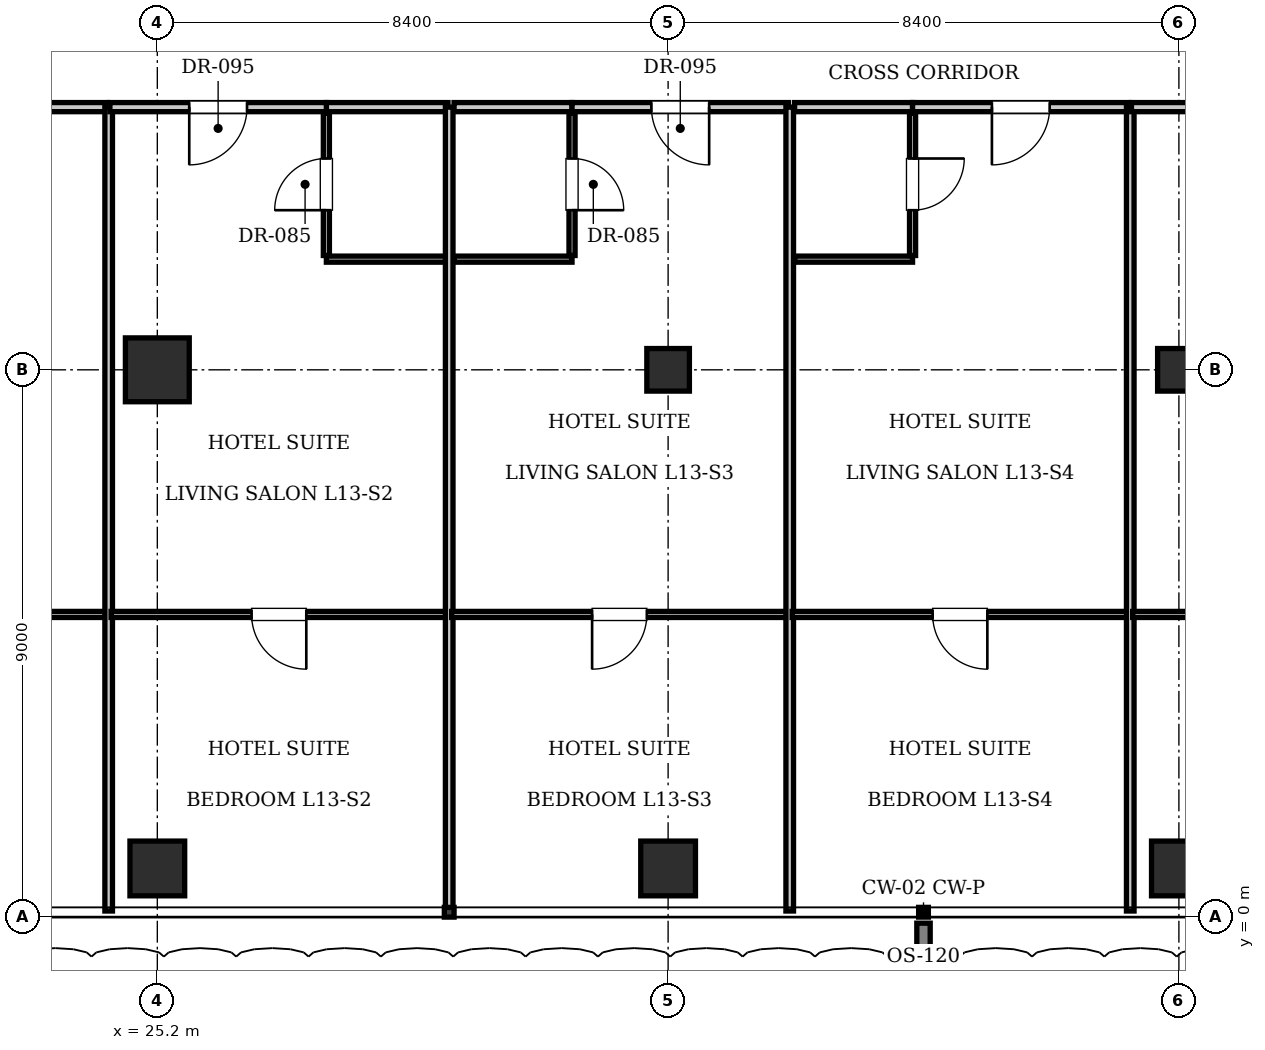
"""IFC4 building model, lengths in metres.
Left out: names, types, materials, properties, quantities, classifications, styles, units other than length and angle.
Written with IfcOpenShell. Run it as: python <this file> out.ifc"""

import sys

from ifc_helpers import new_model, si_unit, direction, frame, frame_2d, origin, origin_2d, place, context, subcontext, project, spatial, rectangle, i_section, extrude, element, fill, save


model = new_model("IFC4")
c1 = context("Model", 3, precision=1e-05, world=origin(), true_north=direction((0.0, 1.0)))
c2 = subcontext(c1, "Body", "Model", "MODEL_VIEW")
j1 = project(units=[si_unit("LENGTHUNIT", "METRE"), si_unit("PLANEANGLEUNIT", "RADIAN")], contexts=[c1])
p1 = place(None, origin())
s1 = spatial("IfcSite", under=j1, at=p1, CompositionType="ELEMENT")
p2 = place(p1, origin())
s2 = spatial("IfcBuilding", under=s1, at=p2, CompositionType="ELEMENT")
p3 = place(p2, frame((0.0, 0.0, 57.75)))
s3 = spatial("IfcBuildingStorey", under=s2, at=p3, CompositionType="ELEMENT", Elevation=57.75)
p4 = place(p3, frame((25.2, 9.0, 0.0), z_axis=(0.0, 0.0, 1.0), x_axis=(1.0, 0.0, 0.0)))
e1 = element("IfcColumn", 1, at=p4, inside=s3, PredefinedType="COLUMN", context=c2, shape_type="SweptSolid", body=[
    extrude(rectangle(XDim=1.05, YDim=1.05, at=origin_2d()), origin(), (0.0, 0.0, 1.0), 3.85),
])
for number, where, z_axis, x_axis in (
    (2, (33.6, 9.0, 0.0), (0.0, 0.0, 1.0), (1.0, 0.0, 0.0)),
    (3, (42.0, 9.0, 0.0), (0.0, 0.0, 1.0), (1.0, 0.0, 0.0)),
):
    element("IfcColumn", number, at=place(p3, frame(where, z_axis=z_axis, x_axis=x_axis)), inside=s3, PredefinedType="COLUMN", context=c2, shape_type="SweptSolid", body=[
        extrude(i_section(OverallWidth=0.7, OverallDepth=0.7, WebThickness=0.028, FlangeThickness=0.044, at=origin_2d()), origin(), (0.0, 0.0, 1.0), 3.85),
    ])
for number, where, z_axis, x_axis in (
    (4, (25.2, 0.8, 0.0), (0.0, 0.0, 1.0), (1.0, 0.0, 0.0)),
    (5, (33.6, 0.8, 0.0), (0.0, 0.0, 1.0), (1.0, 0.0, 0.0)),
    (6, (42.0, 0.8, 0.0), (0.0, 0.0, 1.0), (1.0, 0.0, 0.0)),
):
    element("IfcColumn", number, at=place(p3, frame(where, z_axis=z_axis, x_axis=x_axis)), inside=s3, PredefinedType="COLUMN", context=c2, shape_type="SweptSolid", body=[
        extrude(rectangle(XDim=0.9, YDim=0.9, at=origin_2d()), origin(), (0.0, 0.0, 1.0), 3.85),
    ])
p5 = place(p3, frame((20.82, 13.32, 0.0), z_axis=(0.0, 0.0, 1.0), x_axis=(1.0, 0.0, 0.0)))
e7 = element("IfcWall", 7, at=p5, inside=s3, PredefinedType="PARTITIONING", context=c2, shape_type="SweptSolid", body=[
    extrude(rectangle(XDim=3.56, YDim=0.15, at=frame_2d((1.78, 0.0))), origin(), (0.0, 0.0, 1.0), 3.61),
])
p6 = place(p5, frame((1.305, 0.0, 0.0)))
e8 = element("IfcOpeningElement", 8, at=p6, cuts=e7, PredefinedType="OPENING", context=c2, shape_type="SweptSolid", body=[
    extrude(rectangle(XDim=0.95, YDim=2.15, at=frame_2d((0.475, 1.075))), frame((0.0, 0.085, 0.0), z_axis=(0.0, -1.0, 0.0), x_axis=(1.0, 0.0, 0.0)), (0.0, 0.0, 1.0), 0.17),
])
p7 = place(p3, frame((18.84, 4.977, 0.0), z_axis=(0.0, 0.0, 1.0), x_axis=(1.0, 0.0, 0.0)))
e9 = element("IfcWall", 9, at=p7, inside=s3, PredefinedType="PARTITIONING", context=c2, shape_type="SweptSolid", body=[
    extrude(rectangle(XDim=5.52, YDim=0.1, at=frame_2d((2.76, 0.0))), origin(), (0.0, 0.0, 1.0), 3.61),
])
p8 = place(p7, frame((2.31, 0.0, 0.0)))
e10 = element("IfcOpeningElement", 10, at=p8, cuts=e9, PredefinedType="OPENING", context=c2, shape_type="SweptSolid", body=[
    extrude(rectangle(XDim=0.9, YDim=2.1, at=frame_2d((0.45, 1.05))), frame((0.0, 0.06, 0.0), z_axis=(0.0, -1.0, 0.0), x_axis=(1.0, 0.0, 0.0)), (0.0, 0.0, 1.0), 0.12),
])
p9 = place(p3, frame((24.4, 0.1, 0.0), z_axis=(0.0, 0.0, 1.0), x_axis=(0.0, 1.0, 0.0)))
e11 = element("IfcWall", 11, at=p9, inside=s3, PredefinedType="PARTITIONING", context=c2, shape_type="SweptSolid", body=[
    extrude(rectangle(XDim=13.22, YDim=0.125, at=frame_2d((6.61, 0.0))), origin(), (0.0, 0.0, 1.0), 3.61),
])
p10 = place(p3, frame((27.98, 13.32, 0.0), z_axis=(0.0, 0.0, 1.0), x_axis=(1.0, 0.0, 0.0)))
e12 = element("IfcWall", 12, at=p10, inside=s3, PredefinedType="PARTITIONING", context=c2, shape_type="SweptSolid", body=[
    extrude(rectangle(XDim=2.0, YDim=0.15, at=frame_2d((1.0, 0.0))), origin(), (0.0, 0.0, 1.0), 3.61),
])
p11 = place(p3, frame((27.98, 10.82, 0.0), z_axis=(0.0, 0.0, 1.0), x_axis=(1.0, 0.0, 0.0)))
e13 = element("IfcWall", 13, at=p11, inside=s3, PredefinedType="PARTITIONING", context=c2, shape_type="SweptSolid", body=[
    extrude(rectangle(XDim=1.98, YDim=0.1, at=frame_2d((0.99, 0.0))), origin(), (0.0, 0.0, 1.0), 3.61),
])
p12 = place(p3, frame((27.98, 10.88, 0.0), z_axis=(0.0, 0.0, 1.0), x_axis=(0.0, 1.0, 0.0)))
e14 = element("IfcWall", 14, at=p12, inside=s3, PredefinedType="PARTITIONING", context=c2, shape_type="SweptSolid", body=[
    extrude(rectangle(XDim=2.34, YDim=0.1, at=frame_2d((1.17, 0.0))), origin(), (0.0, 0.0, 1.0), 3.61),
])
p13 = place(p12, frame((0.745, 0.0, 0.0)))
e15 = element("IfcOpeningElement", 15, at=p13, cuts=e14, PredefinedType="OPENING", context=c2, shape_type="SweptSolid", body=[
    extrude(rectangle(XDim=0.85, YDim=2.1, at=frame_2d((0.425, 1.05))), frame((0.0, 0.06, 0.0), z_axis=(0.0, -1.0, 0.0), x_axis=(1.0, 0.0, 0.0)), (0.0, 0.0, 1.0), 0.12),
])
p14 = place(p3, frame((24.42, 13.32, 0.0), z_axis=(0.0, 0.0, 1.0), x_axis=(1.0, 0.0, 0.0)))
e16 = element("IfcWall", 16, at=p14, inside=s3, PredefinedType="PARTITIONING", context=c2, shape_type="SweptSolid", body=[
    extrude(rectangle(XDim=3.56, YDim=0.15, at=frame_2d((1.78, 0.0))), origin(), (0.0, 0.0, 1.0), 3.61),
])
p15 = place(p14, frame((1.305, 0.0, 0.0)))
e17 = element("IfcOpeningElement", 17, at=p15, cuts=e16, PredefinedType="OPENING", context=c2, shape_type="SweptSolid", body=[
    extrude(rectangle(XDim=0.95, YDim=2.15, at=frame_2d((0.475, 1.075))), frame((0.0, 0.085, 0.0), z_axis=(0.0, -1.0, 0.0), x_axis=(1.0, 0.0, 0.0)), (0.0, 0.0, 1.0), 0.17),
])
p16 = place(p3, frame((24.44, 4.977, 0.0), z_axis=(0.0, 0.0, 1.0), x_axis=(1.0, 0.0, 0.0)))
e18 = element("IfcWall", 18, at=p16, inside=s3, PredefinedType="PARTITIONING", context=c2, shape_type="SweptSolid", body=[
    extrude(rectangle(XDim=5.52, YDim=0.1, at=frame_2d((2.76, 0.0))), origin(), (0.0, 0.0, 1.0), 3.61),
])
p17 = place(p16, frame((2.31, 0.0, 0.0)))
e19 = element("IfcOpeningElement", 19, at=p17, cuts=e18, PredefinedType="OPENING", context=c2, shape_type="SweptSolid", body=[
    extrude(rectangle(XDim=0.9, YDim=2.1, at=frame_2d((0.45, 1.05))), frame((0.0, 0.06, 0.0), z_axis=(0.0, -1.0, 0.0), x_axis=(1.0, 0.0, 0.0)), (0.0, 0.0, 1.0), 0.12),
])
p18 = place(p3, frame((30.0, 0.1, 0.0), z_axis=(0.0, 0.0, 1.0), x_axis=(0.0, 1.0, 0.0)))
e20 = element("IfcWall", 20, at=p18, inside=s3, PredefinedType="PARTITIONING", context=c2, shape_type="SweptSolid", body=[
    extrude(rectangle(XDim=13.22, YDim=0.125, at=frame_2d((6.61, 0.0))), origin(), (0.0, 0.0, 1.0), 3.61),
])
p19 = place(p3, frame((30.08, 13.32, 0.0), z_axis=(0.0, 0.0, 1.0), x_axis=(1.0, 0.0, 0.0)))
e21 = element("IfcWall", 21, at=p19, inside=s3, PredefinedType="PARTITIONING", context=c2, shape_type="SweptSolid", body=[
    extrude(rectangle(XDim=1.94, YDim=0.15, at=frame_2d((0.97, 0.0))), origin(), (0.0, 0.0, 1.0), 3.61),
])
p20 = place(p3, frame((30.08, 10.82, 0.0), z_axis=(0.0, 0.0, 1.0), x_axis=(1.0, 0.0, 0.0)))
e22 = element("IfcWall", 22, at=p20, inside=s3, PredefinedType="PARTITIONING", context=c2, shape_type="SweptSolid", body=[
    extrude(rectangle(XDim=1.94, YDim=0.1, at=frame_2d((0.97, 0.0))), origin(), (0.0, 0.0, 1.0), 3.61),
])
p21 = place(p3, frame((32.02, 10.88, 0.0), z_axis=(0.0, 0.0, 1.0), x_axis=(0.0, 1.0, 0.0)))
e23 = element("IfcWall", 23, at=p21, inside=s3, PredefinedType="PARTITIONING", context=c2, shape_type="SweptSolid", body=[
    extrude(rectangle(XDim=2.34, YDim=0.1, at=frame_2d((1.17, 0.0))), origin(), (0.0, 0.0, 1.0), 3.61),
])
p22 = place(p21, frame((0.745, 0.0, 0.0)))
e24 = element("IfcOpeningElement", 24, at=p22, cuts=e23, PredefinedType="OPENING", context=c2, shape_type="SweptSolid", body=[
    extrude(rectangle(XDim=0.85, YDim=2.1, at=frame_2d((0.425, 1.05))), frame((0.0, 0.06, 0.0), z_axis=(0.0, -1.0, 0.0), x_axis=(1.0, 0.0, 0.0)), (0.0, 0.0, 1.0), 0.12),
])
p23 = place(p3, frame((32.02, 13.32, 0.0), z_axis=(0.0, 0.0, 1.0), x_axis=(1.0, 0.0, 0.0)))
e25 = element("IfcWall", 25, at=p23, inside=s3, PredefinedType="PARTITIONING", context=c2, shape_type="SweptSolid", body=[
    extrude(rectangle(XDim=3.56, YDim=0.15, at=frame_2d((1.78, 0.0))), origin(), (0.0, 0.0, 1.0), 3.61),
])
p24 = place(p23, frame((1.305, 0.0, 0.0)))
e26 = element("IfcOpeningElement", 26, at=p24, cuts=e25, PredefinedType="OPENING", context=c2, shape_type="SweptSolid", body=[
    extrude(rectangle(XDim=0.95, YDim=2.15, at=frame_2d((0.475, 1.075))), frame((0.0, 0.085, 0.0), z_axis=(0.0, -1.0, 0.0), x_axis=(1.0, 0.0, 0.0)), (0.0, 0.0, 1.0), 0.17),
])
p25 = place(p3, frame((30.04, 4.977, 0.0), z_axis=(0.0, 0.0, 1.0), x_axis=(1.0, 0.0, 0.0)))
e27 = element("IfcWall", 27, at=p25, inside=s3, PredefinedType="PARTITIONING", context=c2, shape_type="SweptSolid", body=[
    extrude(rectangle(XDim=5.52, YDim=0.1, at=frame_2d((2.76, 0.0))), origin(), (0.0, 0.0, 1.0), 3.61),
])
p26 = place(p25, frame((2.31, 0.0, 0.0)))
e28 = element("IfcOpeningElement", 28, at=p26, cuts=e27, PredefinedType="OPENING", context=c2, shape_type="SweptSolid", body=[
    extrude(rectangle(XDim=0.9, YDim=2.1, at=frame_2d((0.45, 1.05))), frame((0.0, 0.06, 0.0), z_axis=(0.0, -1.0, 0.0), x_axis=(1.0, 0.0, 0.0)), (0.0, 0.0, 1.0), 0.12),
])
p27 = place(p3, frame((35.6, 0.1, 0.0), z_axis=(0.0, 0.0, 1.0), x_axis=(0.0, 1.0, 0.0)))
e29 = element("IfcWall", 29, at=p27, inside=s3, PredefinedType="PARTITIONING", context=c2, shape_type="SweptSolid", body=[
    extrude(rectangle(XDim=13.22, YDim=0.125, at=frame_2d((6.61, 0.0))), origin(), (0.0, 0.0, 1.0), 3.61),
])
p28 = place(p3, frame((35.68, 13.32, 0.0), z_axis=(0.0, 0.0, 1.0), x_axis=(1.0, 0.0, 0.0)))
e30 = element("IfcWall", 30, at=p28, inside=s3, PredefinedType="PARTITIONING", context=c2, shape_type="SweptSolid", body=[
    extrude(rectangle(XDim=1.94, YDim=0.15, at=frame_2d((0.97, 0.0))), origin(), (0.0, 0.0, 1.0), 3.61),
])
p29 = place(p3, frame((35.68, 10.82, 0.0), z_axis=(0.0, 0.0, 1.0), x_axis=(1.0, 0.0, 0.0)))
e31 = element("IfcWall", 31, at=p29, inside=s3, PredefinedType="PARTITIONING", context=c2, shape_type="SweptSolid", body=[
    extrude(rectangle(XDim=1.94, YDim=0.1, at=frame_2d((0.97, 0.0))), origin(), (0.0, 0.0, 1.0), 3.61),
])
p30 = place(p3, frame((37.62, 10.88, 0.0), z_axis=(0.0, 0.0, 1.0), x_axis=(0.0, 1.0, 0.0)))
e32 = element("IfcWall", 32, at=p30, inside=s3, PredefinedType="PARTITIONING", context=c2, shape_type="SweptSolid", body=[
    extrude(rectangle(XDim=2.34, YDim=0.1, at=frame_2d((1.17, 0.0))), origin(), (0.0, 0.0, 1.0), 3.61),
])
p31 = place(p30, frame((0.745, 0.0, 0.0)))
e33 = element("IfcOpeningElement", 33, at=p31, cuts=e32, PredefinedType="OPENING", context=c2, shape_type="SweptSolid", body=[
    extrude(rectangle(XDim=0.85, YDim=2.1, at=frame_2d((0.425, 1.05))), frame((0.0, 0.06, 0.0), z_axis=(0.0, -1.0, 0.0), x_axis=(1.0, 0.0, 0.0)), (0.0, 0.0, 1.0), 0.12),
])
p32 = place(p3, frame((37.62, 13.32, 0.0), z_axis=(0.0, 0.0, 1.0), x_axis=(1.0, 0.0, 0.0)))
e34 = element("IfcWall", 34, at=p32, inside=s3, PredefinedType="PARTITIONING", context=c2, shape_type="SweptSolid", body=[
    extrude(rectangle(XDim=3.56, YDim=0.15, at=frame_2d((1.78, 0.0))), origin(), (0.0, 0.0, 1.0), 3.61),
])
p33 = place(p32, frame((1.305, 0.0, 0.0)))
e35 = element("IfcOpeningElement", 35, at=p33, cuts=e34, PredefinedType="OPENING", context=c2, shape_type="SweptSolid", body=[
    extrude(rectangle(XDim=0.95, YDim=2.15, at=frame_2d((0.475, 1.075))), frame((0.0, 0.085, 0.0), z_axis=(0.0, -1.0, 0.0), x_axis=(1.0, 0.0, 0.0)), (0.0, 0.0, 1.0), 0.17),
])
p34 = place(p3, frame((35.64, 4.977, 0.0), z_axis=(0.0, 0.0, 1.0), x_axis=(1.0, 0.0, 0.0)))
e36 = element("IfcWall", 36, at=p34, inside=s3, PredefinedType="PARTITIONING", context=c2, shape_type="SweptSolid", body=[
    extrude(rectangle(XDim=5.52, YDim=0.1, at=frame_2d((2.76, 0.0))), origin(), (0.0, 0.0, 1.0), 3.61),
])
p35 = place(p34, frame((2.31, 0.0, 0.0)))
e37 = element("IfcOpeningElement", 37, at=p35, cuts=e36, PredefinedType="OPENING", context=c2, shape_type="SweptSolid", body=[
    extrude(rectangle(XDim=0.9, YDim=2.1, at=frame_2d((0.45, 1.05))), frame((0.0, 0.06, 0.0), z_axis=(0.0, -1.0, 0.0), x_axis=(1.0, 0.0, 0.0)), (0.0, 0.0, 1.0), 0.12),
])
p36 = place(p3, frame((41.2, 0.1, 0.0), z_axis=(0.0, 0.0, 1.0), x_axis=(0.0, 1.0, 0.0)))
e38 = element("IfcWall", 38, at=p36, inside=s3, PredefinedType="PARTITIONING", context=c2, shape_type="SweptSolid", body=[
    extrude(rectangle(XDim=13.22, YDim=0.125, at=frame_2d((6.61, 0.0))), origin(), (0.0, 0.0, 1.0), 3.61),
])
p37 = place(p3, frame((41.22, 13.32, 0.0), z_axis=(0.0, 0.0, 1.0), x_axis=(1.0, 0.0, 0.0)))
e39 = element("IfcWall", 39, at=p37, inside=s3, PredefinedType="PARTITIONING", context=c2, shape_type="SweptSolid", body=[
    extrude(rectangle(XDim=3.56, YDim=0.15, at=frame_2d((1.78, 0.0))), origin(), (0.0, 0.0, 1.0), 3.61),
])
p38 = place(p37, frame((1.305, 0.0, 0.0)))
e40 = element("IfcOpeningElement", 40, at=p38, cuts=e39, PredefinedType="OPENING", context=c2, shape_type="SweptSolid", body=[
    extrude(rectangle(XDim=0.95, YDim=2.15, at=frame_2d((0.475, 1.075))), frame((0.0, 0.085, 0.0), z_axis=(0.0, -1.0, 0.0), x_axis=(1.0, 0.0, 0.0)), (0.0, 0.0, 1.0), 0.17),
])
p39 = place(p3, frame((41.24, 4.977, 0.0), z_axis=(0.0, 0.0, 1.0), x_axis=(1.0, 0.0, 0.0)))
e41 = element("IfcWall", 41, at=p39, inside=s3, PredefinedType="PARTITIONING", context=c2, shape_type="SweptSolid", body=[
    extrude(rectangle(XDim=5.52, YDim=0.1, at=frame_2d((2.76, 0.0))), origin(), (0.0, 0.0, 1.0), 3.61),
])
p40 = place(p39, frame((2.31, 0.0, 0.0)))
e42 = element("IfcOpeningElement", 42, at=p40, cuts=e41, PredefinedType="OPENING", context=c2, shape_type="SweptSolid", body=[
    extrude(rectangle(XDim=0.9, YDim=2.1, at=frame_2d((0.45, 1.05))), frame((0.0, 0.06, 0.0), z_axis=(0.0, -1.0, 0.0), x_axis=(1.0, 0.0, 0.0)), (0.0, 0.0, 1.0), 0.12),
])
p41 = place(p13, origin())
e43 = element("IfcDoor", 43, at=p41, inside=s3, OperationType="SINGLE_SWING_LEFT", PredefinedType="DOOR", context=c2, shape_type="SweptSolid", body=[
    extrude(rectangle(XDim=0.85, YDim=2.1, at=frame_2d((0.425, 1.05))), frame((0.0, 0.025, 0.0), z_axis=(0.0, -1.0, 0.0), x_axis=(1.0, 0.0, 0.0)), (0.0, 0.0, 1.0), 0.05),
])
fill(e15, e43)
p42 = place(p15, frame((0.95, 0.0, 0.0), z_axis=(0.0, 0.0, 1.0), x_axis=(-1.0, 0.0, 0.0)))
e44 = element("IfcDoor", 44, at=p42, inside=s3, OperationType="SINGLE_SWING_RIGHT", PredefinedType="DOOR", context=c2, shape_type="SweptSolid", body=[
    extrude(rectangle(XDim=0.95, YDim=2.15, at=frame_2d((0.475, 1.075))), frame((0.0, 0.025, 0.0), z_axis=(0.0, -1.0, 0.0), x_axis=(1.0, 0.0, 0.0)), (0.0, 0.0, 1.0), 0.05),
])
fill(e17, e44)
p43 = place(p17, frame((0.9, 0.0, 0.0), z_axis=(0.0, 0.0, 1.0), x_axis=(-1.0, 0.0, 0.0)))
e45 = element("IfcDoor", 45, at=p43, inside=s3, OperationType="SINGLE_SWING_LEFT", PredefinedType="DOOR", context=c2, shape_type="SweptSolid", body=[
    extrude(rectangle(XDim=0.9, YDim=2.1, at=frame_2d((0.45, 1.05))), frame((0.0, 0.025, 0.0), z_axis=(0.0, -1.0, 0.0), x_axis=(1.0, 0.0, 0.0)), (0.0, 0.0, 1.0), 0.05),
])
fill(e19, e45)
p44 = place(p22, frame((0.85, 0.0, 0.0), z_axis=(0.0, 0.0, 1.0), x_axis=(-1.0, 0.0, 0.0)))
e46 = element("IfcDoor", 46, at=p44, inside=s3, OperationType="SINGLE_SWING_RIGHT", PredefinedType="DOOR", context=c2, shape_type="SweptSolid", body=[
    extrude(rectangle(XDim=0.85, YDim=2.1, at=frame_2d((0.425, 1.05))), frame((0.0, 0.025, 0.0), z_axis=(0.0, -1.0, 0.0), x_axis=(1.0, 0.0, 0.0)), (0.0, 0.0, 1.0), 0.05),
])
fill(e24, e46)
p45 = place(p24, frame((0.95, 0.0, 0.0), z_axis=(0.0, 0.0, 1.0), x_axis=(-1.0, 0.0, 0.0)))
e47 = element("IfcDoor", 47, at=p45, inside=s3, OperationType="SINGLE_SWING_LEFT", PredefinedType="DOOR", context=c2, shape_type="SweptSolid", body=[
    extrude(rectangle(XDim=0.95, YDim=2.15, at=frame_2d((0.475, 1.075))), frame((0.0, 0.025, 0.0), z_axis=(0.0, -1.0, 0.0), x_axis=(1.0, 0.0, 0.0)), (0.0, 0.0, 1.0), 0.05),
])
fill(e26, e47)
p46 = place(p26, frame((0.9, 0.0, 0.0), z_axis=(0.0, 0.0, 1.0), x_axis=(-1.0, 0.0, 0.0)))
e48 = element("IfcDoor", 48, at=p46, inside=s3, OperationType="SINGLE_SWING_RIGHT", PredefinedType="DOOR", context=c2, shape_type="SweptSolid", body=[
    extrude(rectangle(XDim=0.9, YDim=2.1, at=frame_2d((0.45, 1.05))), frame((0.0, 0.025, 0.0), z_axis=(0.0, -1.0, 0.0), x_axis=(1.0, 0.0, 0.0)), (0.0, 0.0, 1.0), 0.05),
])
fill(e28, e48)
p47 = place(p31, frame((0.85, 0.0, 0.0), z_axis=(0.0, 0.0, 1.0), x_axis=(-1.0, 0.0, 0.0)))
e49 = element("IfcDoor", 49, at=p47, inside=s3, OperationType="SINGLE_SWING_LEFT", PredefinedType="DOOR", context=c2, shape_type="SweptSolid", body=[
    extrude(rectangle(XDim=0.85, YDim=2.1, at=frame_2d((0.425, 1.05))), frame((0.0, 0.025, 0.0), z_axis=(0.0, -1.0, 0.0), x_axis=(1.0, 0.0, 0.0)), (0.0, 0.0, 1.0), 0.05),
])
fill(e33, e49)
p48 = place(p33, frame((0.95, 0.0, 0.0), z_axis=(0.0, 0.0, 1.0), x_axis=(-1.0, 0.0, 0.0)))
e50 = element("IfcDoor", 50, at=p48, inside=s3, OperationType="SINGLE_SWING_RIGHT", PredefinedType="DOOR", context=c2, shape_type="SweptSolid", body=[
    extrude(rectangle(XDim=0.95, YDim=2.15, at=frame_2d((0.475, 1.075))), frame((0.0, 0.025, 0.0), z_axis=(0.0, -1.0, 0.0), x_axis=(1.0, 0.0, 0.0)), (0.0, 0.0, 1.0), 0.05),
])
fill(e35, e50)
p49 = place(p35, frame((0.9, 0.0, 0.0), z_axis=(0.0, 0.0, 1.0), x_axis=(-1.0, 0.0, 0.0)))
e51 = element("IfcDoor", 51, at=p49, inside=s3, OperationType="SINGLE_SWING_LEFT", PredefinedType="DOOR", context=c2, shape_type="SweptSolid", body=[
    extrude(rectangle(XDim=0.9, YDim=2.1, at=frame_2d((0.45, 1.05))), frame((0.0, 0.025, 0.0), z_axis=(0.0, -1.0, 0.0), x_axis=(1.0, 0.0, 0.0)), (0.0, 0.0, 1.0), 0.05),
])
fill(e37, e51)
save(model, sys.argv[1])
